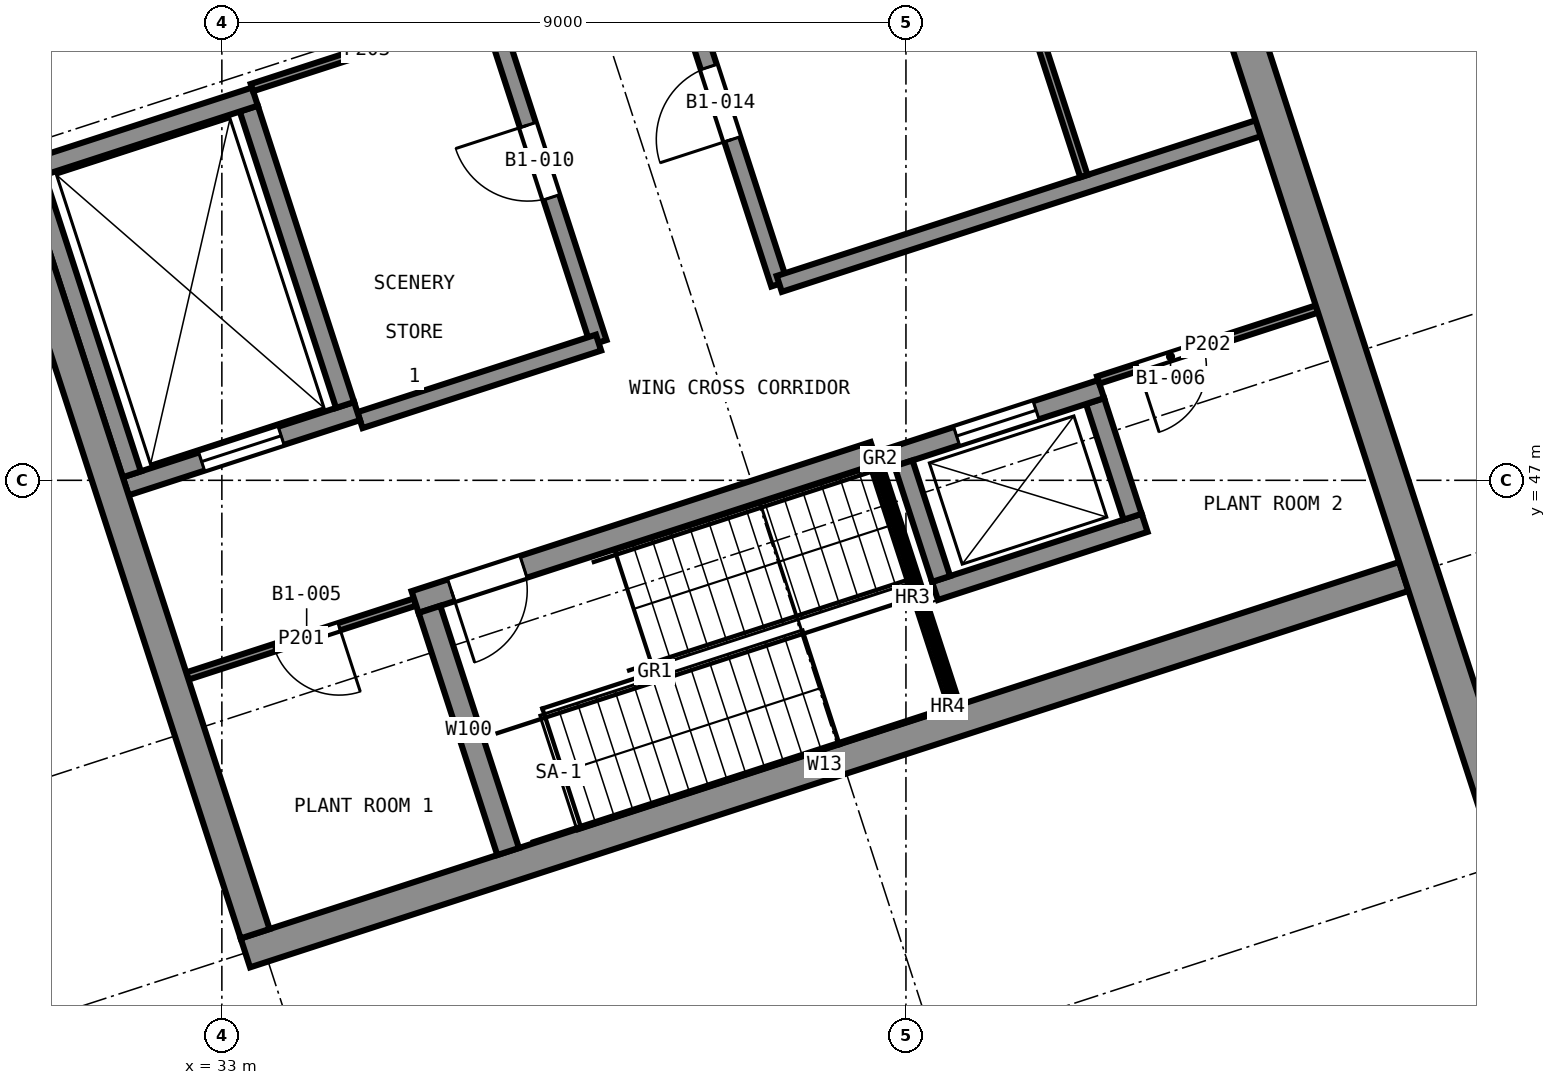
"""IFC4 building model, lengths in metres.
Left out: names, types, materials, properties, quantities, classifications, styles, units other than length and angle.
Written with IfcOpenShell. Run it as: python <this file> out.ifc"""

import sys

from ifc_helpers import new_model, si_unit, direction, frame, frame_2d, origin, place, context, subcontext, project, spatial, rectangle, extrude, element, fill, save


model = new_model("IFC4")
c1 = context("Model", 3, precision=1e-05, world=origin(), true_north=direction((0.0, 1.0)))
c2 = subcontext(c1, "Body", "Model", "MODEL_VIEW")
j1 = project(units=[si_unit("LENGTHUNIT", "METRE"), si_unit("PLANEANGLEUNIT", "RADIAN")], contexts=[c1])
p1 = place(None, origin())
s1 = spatial("IfcSite", under=j1, at=p1, CompositionType="ELEMENT")
p2 = place(p1, origin())
s2 = spatial("IfcBuilding", under=s1, at=p2, CompositionType="ELEMENT")
p3 = place(p2, frame((0.0, 0.0, -5.0)))
s3 = spatial("IfcBuildingStorey", under=s2, at=p3, CompositionType="ELEMENT", Elevation=-5.0)
p4 = place(p3, frame((49.93, 42.214, 0.0), z_axis=(0.0, 0.0, 1.0), x_axis=(-0.309013046462, 0.951057799041, 0.0)))
e1 = element("IfcWall", 1, at=p4, inside=s3, PredefinedType="SHEAR", context=c2, shape_type="SweptSolid", body=[
    extrude(rectangle(XDim=47.55, YDim=0.45, at=frame_2d((23.775, 0.0))), origin(), (0.0, 0.0, 1.0), 5.0),
])
p5 = place(p4, frame((11.775, 0.0, 0.0)))
e2 = element("IfcOpeningElement", 2, at=p5, cuts=e1, PredefinedType="OPENING", context=c2, shape_type="SweptSolid", body=[
    extrude(rectangle(XDim=1.2, YDim=2.1, at=frame_2d((0.6, 1.05))), frame((0.0, 0.235, 0.0), z_axis=(0.0, -1.0, 0.0), x_axis=(1.0, 0.0, 0.0)), (0.0, 0.0, 1.0), 0.47),
])
p6 = place(p4, frame((44.175, 0.0, 0.0)))
e3 = element("IfcOpeningElement", 3, at=p6, cuts=e1, PredefinedType="OPENING", context=c2, shape_type="SweptSolid", body=[
    extrude(rectangle(XDim=1.2, YDim=2.1, at=frame_2d((0.6, 1.05))), frame((0.0, 0.235, 0.0), z_axis=(0.0, -1.0, 0.0), x_axis=(1.0, 0.0, 0.0)), (0.0, 0.0, 1.0), 0.47),
])
p7 = place(p3, frame((48.55, 45.735, 0.0), z_axis=(0.0, 0.0, 1.0), x_axis=(-0.951058472728, -0.309010973029, 0.0)))
e4 = element("IfcWall", 4, at=p7, inside=s3, PredefinedType="SOLIDWALL", context=c2, shape_type="SweptSolid", body=[
    extrude(rectangle(XDim=16.025, YDim=0.4, at=frame_2d((8.012, 0.0))), origin(), (0.0, 0.0, 1.0), 5.0),
])
p8 = place(p3, frame((33.438, 41.035, 0.0), z_axis=(0.0, 0.0, 1.0), x_axis=(-0.309020156104, 0.951055488981, 0.0)))
e5 = element("IfcWall", 5, at=p8, inside=s3, PredefinedType="SOLIDWALL", context=c2, shape_type="SweptSolid", body=[
    extrude(rectangle(XDim=53.6, YDim=0.4, at=frame_2d((26.8, 0.0))), origin(), (0.0, 0.0, 1.0), 5.0),
])
p9 = place(p3, frame((41.581, 47.361, 0.0), z_axis=(0.0, 0.0, 1.0), x_axis=(-0.951058929949, -0.309009565815, 0.0)))
e6 = element("IfcWall", 6, at=p9, inside=s3, PredefinedType="SOLIDWALL", context=c2, shape_type="SweptSolid", body=[
    extrude(rectangle(XDim=6.35, YDim=0.3, at=frame_2d((3.175, 0.0))), origin(), (0.0, 0.0, 1.0), 4.6),
])
p10 = place(p9, frame((4.85, 0.0, 0.0)))
e7 = element("IfcOpeningElement", 7, at=p10, cuts=e6, PredefinedType="OPENING", context=c2, shape_type="SweptSolid", body=[
    extrude(rectangle(XDim=1.0, YDim=2.1, at=frame_2d((0.5, 1.05))), frame((0.0, 0.16, 0.0), z_axis=(0.0, -1.0, 0.0), x_axis=(1.0, 0.0, 0.0)), (0.0, 0.0, 1.0), 0.32),
])
p11 = place(p3, frame((35.731, 45.302, 0.0), z_axis=(0.0, 0.0, 1.0), x_axis=(0.309003676349, -0.951060843481, 0.0)))
e8 = element("IfcWall", 8, at=p11, inside=s3, PredefinedType="SOLIDWALL", context=c2, shape_type="SweptSolid", body=[
    extrude(rectangle(XDim=3.35, YDim=0.3, at=frame_2d((1.675, 0.0))), origin(), (0.0, 0.0, 1.0), 4.6),
])
p12 = place(p3, frame((42.382, 45.544, 0.0), z_axis=(0.0, 0.0, 1.0), x_axis=(0.951071801089, 0.308969948659, 0.0)))
e9 = element("IfcWall", 9, at=p12, inside=s3, PredefinedType="SHEAR", context=c2, shape_type="SweptSolid", body=[
    extrude(rectangle(XDim=2.9, YDim=0.25, at=frame_2d((1.45, 0.0))), origin(), (0.0, 0.0, 1.0), 5.0),
])
p13 = place(p3, frame((44.982, 46.521, 0.0), z_axis=(0.0, 0.0, 1.0), x_axis=(-0.308986014439, 0.951066581729, 0.0)))
e10 = element("IfcWall", 10, at=p13, inside=s3, PredefinedType="SHEAR", context=c2, shape_type="SweptSolid", body=[
    extrude(rectangle(XDim=1.6, YDim=0.25, at=frame_2d((0.8, 0.0))), origin(), (0.0, 0.0, 1.0), 5.0),
])
p14 = place(p3, frame((44.568, 48.2, 0.0), z_axis=(0.0, 0.0, 1.0), x_axis=(-0.951047059821, -0.309046096893, 0.0)))
e11 = element("IfcWall", 11, at=p14, inside=s3, PredefinedType="SHEAR", context=c2, shape_type="SweptSolid", body=[
    extrude(rectangle(XDim=2.9, YDim=0.25, at=frame_2d((1.45, 0.0))), origin(), (0.0, 0.0, 1.0), 5.0),
])
p15 = place(p14, frame((0.9, 0.0, 0.0)))
e12 = element("IfcOpeningElement", 12, at=p15, cuts=e11, PredefinedType="OPENING", context=c2, shape_type="SweptSolid", body=[
    extrude(rectangle(XDim=1.1, YDim=2.1, at=frame_2d((0.55, 1.05))), frame((0.0, 0.135, 0.0), z_axis=(0.0, -1.0, 0.0), x_axis=(1.0, 0.0, 0.0)), (0.0, 0.0, 1.0), 0.27),
])
p16 = place(p3, frame((41.968, 47.224, 0.0), z_axis=(0.0, 0.0, 1.0), x_axis=(0.308986014439, -0.951066581729, 0.0)))
e13 = element("IfcWall", 13, at=p16, inside=s3, PredefinedType="SHEAR", context=c2, shape_type="SweptSolid", body=[
    extrude(rectangle(XDim=1.6, YDim=0.25, at=frame_2d((0.8, 0.0))), origin(), (0.0, 0.0, 1.0), 5.0),
])
p17 = place(p3, frame((31.735, 46.922, 0.0), z_axis=(0.0, 0.0, 1.0), x_axis=(0.95104415986, 0.309055020985, 0.0)))
e14 = element("IfcWall", 14, at=p17, inside=s3, PredefinedType="SHEAR", context=c2, shape_type="SweptSolid", body=[
    extrude(rectangle(XDim=3.2, YDim=0.25, at=frame_2d((1.6, 0.0))), origin(), (0.0, 0.0, 1.0), 5.0),
])
p18 = place(p17, frame((1.05, 0.0, 0.0)))
e15 = element("IfcOpeningElement", 15, at=p18, cuts=e14, PredefinedType="OPENING", context=c2, shape_type="SweptSolid", body=[
    extrude(rectangle(XDim=1.1, YDim=2.1, at=frame_2d((0.55, 1.05))), frame((0.0, 0.135, 0.0), z_axis=(0.0, -1.0, 0.0), x_axis=(1.0, 0.0, 0.0)), (0.0, 0.0, 1.0), 0.27),
])
p19 = place(p3, frame((34.621, 47.991, 0.0), z_axis=(0.0, 0.0, 1.0), x_axis=(-0.309055103076, 0.951044133184, 0.0)))
e16 = element("IfcWall", 16, at=p19, inside=s3, PredefinedType="SHEAR", context=c2, shape_type="SweptSolid", body=[
    extrude(rectangle(XDim=4.1, YDim=0.25, at=frame_2d((2.05, 0.0))), origin(), (0.0, 0.0, 1.0), 5.0),
])
p20 = place(p3, frame((33.434, 52.048, 0.0), z_axis=(0.0, 0.0, 1.0), x_axis=(-0.951066581729, -0.308986014439, 0.0)))
e17 = element("IfcWall", 17, at=p20, inside=s3, PredefinedType="SHEAR", context=c2, shape_type="SweptSolid", body=[
    extrude(rectangle(XDim=3.2, YDim=0.25, at=frame_2d((1.6, 0.0))), origin(), (0.0, 0.0, 1.0), 5.0),
])
p21 = place(p3, frame((30.548, 50.979, 0.0), z_axis=(0.0, 0.0, 1.0), x_axis=(0.309055103076, -0.951044133184, 0.0)))
e18 = element("IfcWall", 18, at=p21, inside=s3, PredefinedType="SHEAR", context=c2, shape_type="SweptSolid", body=[
    extrude(rectangle(XDim=4.1, YDim=0.25, at=frame_2d((2.05, 0.0))), origin(), (0.0, 0.0, 1.0), 5.0),
])
p22 = place(p3, frame((37.956, 48.812, 0.0), z_axis=(0.0, 0.0, 1.0), x_axis=(-0.30901736393, 0.951056396219, 0.0)))
e19 = element("IfcWall", 19, at=p22, inside=s3, PredefinedType="SOLIDWALL", context=c2, shape_type="SweptSolid", body=[
    extrude(rectangle(XDim=41.7, YDim=0.22, at=frame_2d((20.85, 0.0))), origin(), (0.0, 0.0, 1.0), 4.6),
])
p23 = place(p22, frame((2.009, 0.0, 0.0)))
e20 = element("IfcOpeningElement", 20, at=p23, cuts=e19, PredefinedType="OPENING", context=c2, shape_type="SweptSolid", body=[
    extrude(rectangle(XDim=1.0, YDim=2.1, at=frame_2d((0.5, 1.05))), frame((0.0, 0.12, 0.0), z_axis=(0.0, -1.0, 0.0), x_axis=(1.0, 0.0, 0.0)), (0.0, 0.0, 1.0), 0.24),
])
p24 = place(p22, frame((11.495, 0.0, 0.0)))
e21 = element("IfcOpeningElement", 21, at=p24, cuts=e19, PredefinedType="OPENING", context=c2, shape_type="SweptSolid", body=[
    extrude(rectangle(XDim=1.0, YDim=2.1, at=frame_2d((0.5, 1.05))), frame((0.0, 0.12, 0.0), z_axis=(0.0, -1.0, 0.0), x_axis=(1.0, 0.0, 0.0)), (0.0, 0.0, 1.0), 0.24),
])
p25 = place(p22, frame((24.3, 0.0, 0.0)))
e22 = element("IfcOpeningElement", 22, at=p25, cuts=e19, PredefinedType="OPENING", context=c2, shape_type="SweptSolid", body=[
    extrude(rectangle(XDim=1.0, YDim=2.1, at=frame_2d((0.5, 1.05))), frame((0.0, 0.12, 0.0), z_axis=(0.0, -1.0, 0.0), x_axis=(1.0, 0.0, 0.0)), (0.0, 0.0, 1.0), 0.24),
])
p26 = place(p22, frame((35.045, 0.0, 0.0)))
e23 = element("IfcOpeningElement", 23, at=p26, cuts=e19, PredefinedType="OPENING", context=c2, shape_type="SweptSolid", body=[
    extrude(rectangle(XDim=1.0, YDim=2.1, at=frame_2d((0.5, 1.05))), frame((0.0, 0.12, 0.0), z_axis=(0.0, -1.0, 0.0), x_axis=(1.0, 0.0, 0.0)), (0.0, 0.0, 1.0), 0.24),
])
p27 = place(p3, frame((40.333, 49.584, 0.0), z_axis=(0.0, 0.0, 1.0), x_axis=(-0.309015643281, 0.951056955291, 0.0)))
e24 = element("IfcWall", 24, at=p27, inside=s3, PredefinedType="SOLIDWALL", context=c2, shape_type="SweptSolid", body=[
    extrude(rectangle(XDim=41.7, YDim=0.22, at=frame_2d((20.85, 0.0))), origin(), (0.0, 0.0, 1.0), 4.6),
])
p28 = place(p27, frame((2.0, 0.0, 0.0)))
e25 = element("IfcOpeningElement", 25, at=p28, cuts=e24, PredefinedType="OPENING", context=c2, shape_type="SweptSolid", body=[
    extrude(rectangle(XDim=1.0, YDim=2.1, at=frame_2d((0.5, 1.05))), frame((0.0, 0.12, 0.0), z_axis=(0.0, -1.0, 0.0), x_axis=(1.0, 0.0, 0.0)), (0.0, 0.0, 1.0), 0.24),
])
p29 = place(p27, frame((8.285, 0.0, 0.0)))
e26 = element("IfcOpeningElement", 26, at=p29, cuts=e24, PredefinedType="OPENING", context=c2, shape_type="SweptSolid", body=[
    extrude(rectangle(XDim=1.0, YDim=2.1, at=frame_2d((0.5, 1.05))), frame((0.0, 0.12, 0.0), z_axis=(0.0, -1.0, 0.0), x_axis=(1.0, 0.0, 0.0)), (0.0, 0.0, 1.0), 0.24),
])
p30 = place(p27, frame((16.475, 0.0, 0.0)))
e27 = element("IfcOpeningElement", 27, at=p30, cuts=e24, PredefinedType="OPENING", context=c2, shape_type="SweptSolid", body=[
    extrude(rectangle(XDim=1.0, YDim=2.1, at=frame_2d((0.5, 1.05))), frame((0.0, 0.12, 0.0), z_axis=(0.0, -1.0, 0.0), x_axis=(1.0, 0.0, 0.0)), (0.0, 0.0, 1.0), 0.24),
])
p31 = place(p27, frame((25.752, 0.0, 0.0)))
e28 = element("IfcOpeningElement", 28, at=p31, cuts=e24, PredefinedType="OPENING", context=c2, shape_type="SweptSolid", body=[
    extrude(rectangle(XDim=1.0, YDim=2.1, at=frame_2d((0.5, 1.05))), frame((0.0, 0.12, 0.0), z_axis=(0.0, -1.0, 0.0), x_axis=(1.0, 0.0, 0.0)), (0.0, 0.0, 1.0), 0.24),
])
p32 = place(p27, frame((32.761, 0.0, 0.0)))
e29 = element("IfcOpeningElement", 29, at=p32, cuts=e24, PredefinedType="OPENING", context=c2, shape_type="SweptSolid", body=[
    extrude(rectangle(XDim=1.0, YDim=2.1, at=frame_2d((0.5, 1.05))), frame((0.0, 0.12, 0.0), z_axis=(0.0, -1.0, 0.0), x_axis=(1.0, 0.0, 0.0)), (0.0, 0.0, 1.0), 0.24),
])
p33 = place(p3, frame((34.817, 47.792, 0.0), z_axis=(0.0, 0.0, 1.0), x_axis=(0.951053095941, 0.309027520945, 0.0)))
e30 = element("IfcWall", 30, at=p33, inside=s3, PredefinedType="SOLIDWALL", context=c2, shape_type="SweptSolid", body=[
    extrude(rectangle(XDim=3.3, YDim=0.22, at=frame_2d((1.65, 0.0))), origin(), (0.0, 0.0, 1.0), 4.6),
])
p34 = place(p3, frame((40.333, 49.584, 0.0), z_axis=(0.0, 0.0, 1.0), x_axis=(0.95105699893, 0.309015508975, 0.0)))
e31 = element("IfcWall", 31, at=p34, inside=s3, PredefinedType="SOLIDWALL", context=c2, shape_type="SweptSolid", body=[
    extrude(rectangle(XDim=6.65, YDim=0.22, at=frame_2d((3.325, 0.0))), origin(), (0.0, 0.0, 1.0), 4.6),
])
p35 = place(p3, frame((32.546, 44.425, 0.0), z_axis=(0.0, 0.0, 1.0), x_axis=(0.951058557014, 0.309010713619, 0.0)))
e32 = element("IfcWall", 32, at=p35, inside=s3, PredefinedType="PARTITIONING", context=c2, shape_type="SweptSolid", body=[
    extrude(rectangle(XDim=3.15, YDim=0.1, at=frame_2d((1.575, 0.0))), origin(), (0.0, 0.0, 1.0), 4.6),
])
p36 = place(p35, frame((1.2, 0.0, 0.0)))
e33 = element("IfcOpeningElement", 33, at=p36, cuts=e32, PredefinedType="OPENING", context=c2, shape_type="SweptSolid", body=[
    extrude(rectangle(XDim=0.9, YDim=2.1, at=frame_2d((0.45, 1.05))), frame((0.0, 0.06, 0.0), z_axis=(0.0, -1.0, 0.0), x_axis=(1.0, 0.0, 0.0)), (0.0, 0.0, 1.0), 0.12),
])
p37 = place(p3, frame((44.53, 48.319, 0.0), z_axis=(0.0, 0.0, 1.0), x_axis=(0.951053046121, 0.30902767427, 0.0)))
e34 = element("IfcWall", 34, at=p37, inside=s3, PredefinedType="PARTITIONING", context=c2, shape_type="SweptSolid", body=[
    extrude(rectangle(XDim=3.025, YDim=0.1, at=frame_2d((1.512, 0.0))), origin(), (0.0, 0.0, 1.0), 4.6),
])
p38 = place(p37, frame((0.55, 0.0, 0.0)))
e35 = element("IfcOpeningElement", 35, at=p38, cuts=e34, PredefinedType="OPENING", context=c2, shape_type="SweptSolid", body=[
    extrude(rectangle(XDim=0.9, YDim=2.1, at=frame_2d((0.45, 1.05))), frame((0.0, 0.06, 0.0), z_axis=(0.0, -1.0, 0.0), x_axis=(1.0, 0.0, 0.0)), (0.0, 0.0, 1.0), 0.12),
])
p39 = place(p3, frame((33.396, 52.167, 0.0), z_axis=(0.0, 0.0, 1.0), x_axis=(0.951044192343, 0.309054921027, 0.0)))
e36 = element("IfcWall", 36, at=p39, inside=s3, PredefinedType="PARTITIONING", context=c2, shape_type="SweptSolid", body=[
    extrude(rectangle(XDim=3.19, YDim=0.1, at=frame_2d((1.595, 0.0))), origin(), (0.0, 0.0, 1.0), 4.6),
])
p40 = place(p3, frame((42.663, 44.032, 0.0), z_axis=(0.0, 0.0, 1.0), x_axis=(-0.309003676349, 0.951060843481, 0.0)))
e37 = element("IfcWall", 37, at=p40, inside=s3, PredefinedType="PARTITIONING", context=c2, shape_type="SweptSolid", body=[
    extrude(rectangle(XDim=3.35, YDim=0.1, at=frame_2d((1.675, 0.0))), origin(), (0.0, 0.0, 1.0), 4.6),
])
p41 = place(p3, frame((44.341, 51.002, 0.0), z_axis=(0.0, 0.0, 1.0), x_axis=(-0.309015353981, 0.95105704929, 0.0)))
e38 = element("IfcWall", 38, at=p41, inside=s3, PredefinedType="PARTITIONING", context=c2, shape_type="SweptSolid", body=[
    extrude(rectangle(XDim=4.84, YDim=0.1, at=frame_2d((2.42, 0.0))), origin(), (0.0, 0.0, 1.0), 4.6),
])
p42 = place(p15, origin())
e39 = element("IfcDoor", 39, at=p42, inside=s3, OperationType="SLIDING_TO_LEFT", PredefinedType="DOOR", context=c2, shape_type="SweptSolid", body=[
    extrude(rectangle(XDim=1.1, YDim=2.1, at=frame_2d((0.55, 1.05))), frame((0.0, 0.025, 0.0), z_axis=(0.0, -1.0, 0.0), x_axis=(1.0, 0.0, 0.0)), (0.0, 0.0, 1.0), 0.05),
])
fill(e12, e39)
p43 = place(p18, origin())
e40 = element("IfcDoor", 40, at=p43, inside=s3, OperationType="SLIDING_TO_LEFT", PredefinedType="DOOR", context=c2, shape_type="SweptSolid", body=[
    extrude(rectangle(XDim=1.1, YDim=2.1, at=frame_2d((0.55, 1.05))), frame((0.0, 0.025, 0.0), z_axis=(0.0, -1.0, 0.0), x_axis=(1.0, 0.0, 0.0)), (0.0, 0.0, 1.0), 0.05),
])
fill(e15, e40)
p44 = place(p36, frame((0.9, 0.0, 0.0), z_axis=(0.0, 0.0, 1.0), x_axis=(-1.0, 0.0, 0.0)))
e41 = element("IfcDoor", 41, at=p44, inside=s3, OperationType="SINGLE_SWING_RIGHT", PredefinedType="DOOR", context=c2, shape_type="SweptSolid", body=[
    extrude(rectangle(XDim=0.9, YDim=2.1, at=frame_2d((0.45, 1.05))), frame((0.0, 0.025, 0.0), z_axis=(0.0, -1.0, 0.0), x_axis=(1.0, 0.0, 0.0)), (0.0, 0.0, 1.0), 0.05),
])
fill(e33, e41)
p45 = place(p38, frame((0.9, 0.0, 0.0), z_axis=(0.0, 0.0, 1.0), x_axis=(-1.0, 0.0, 0.0)))
e42 = element("IfcDoor", 42, at=p45, inside=s3, OperationType="SINGLE_SWING_LEFT", PredefinedType="DOOR", context=c2, shape_type="SweptSolid", body=[
    extrude(rectangle(XDim=0.9, YDim=2.1, at=frame_2d((0.45, 1.05))), frame((0.0, 0.025, 0.0), z_axis=(0.0, -1.0, 0.0), x_axis=(1.0, 0.0, 0.0)), (0.0, 0.0, 1.0), 0.05),
])
fill(e35, e42)
p46 = place(p23, origin())
e43 = element("IfcDoor", 43, at=p46, inside=s3, OperationType="SINGLE_SWING_LEFT", PredefinedType="DOOR", context=c2, shape_type="SweptSolid", body=[
    extrude(rectangle(XDim=1.0, YDim=2.1, at=frame_2d((0.5, 1.05))), frame((0.0, 0.025, 0.0), z_axis=(0.0, -1.0, 0.0), x_axis=(1.0, 0.0, 0.0)), (0.0, 0.0, 1.0), 0.05),
])
fill(e20, e43)
p47 = place(p28, origin())
e44 = element("IfcDoor", 44, at=p47, inside=s3, OperationType="SINGLE_SWING_RIGHT", PredefinedType="DOOR", context=c2, shape_type="SweptSolid", body=[
    extrude(rectangle(XDim=1.0, YDim=2.1, at=frame_2d((0.5, 1.05))), frame((0.0, 0.025, 0.0), z_axis=(0.0, -1.0, 0.0), x_axis=(1.0, 0.0, 0.0)), (0.0, 0.0, 1.0), 0.05),
])
fill(e25, e44)
p48 = place(p10, origin())
e45 = element("IfcDoor", 45, at=p48, inside=s3, OperationType="SINGLE_SWING_LEFT", PredefinedType="DOOR", context=c2, shape_type="SweptSolid", body=[
    extrude(rectangle(XDim=1.0, YDim=2.1, at=frame_2d((0.5, 1.05))), frame((0.0, 0.025, 0.0), z_axis=(0.0, -1.0, 0.0), x_axis=(1.0, 0.0, 0.0)), (0.0, 0.0, 1.0), 0.05),
])
fill(e7, e45)
save(model, sys.argv[1])
